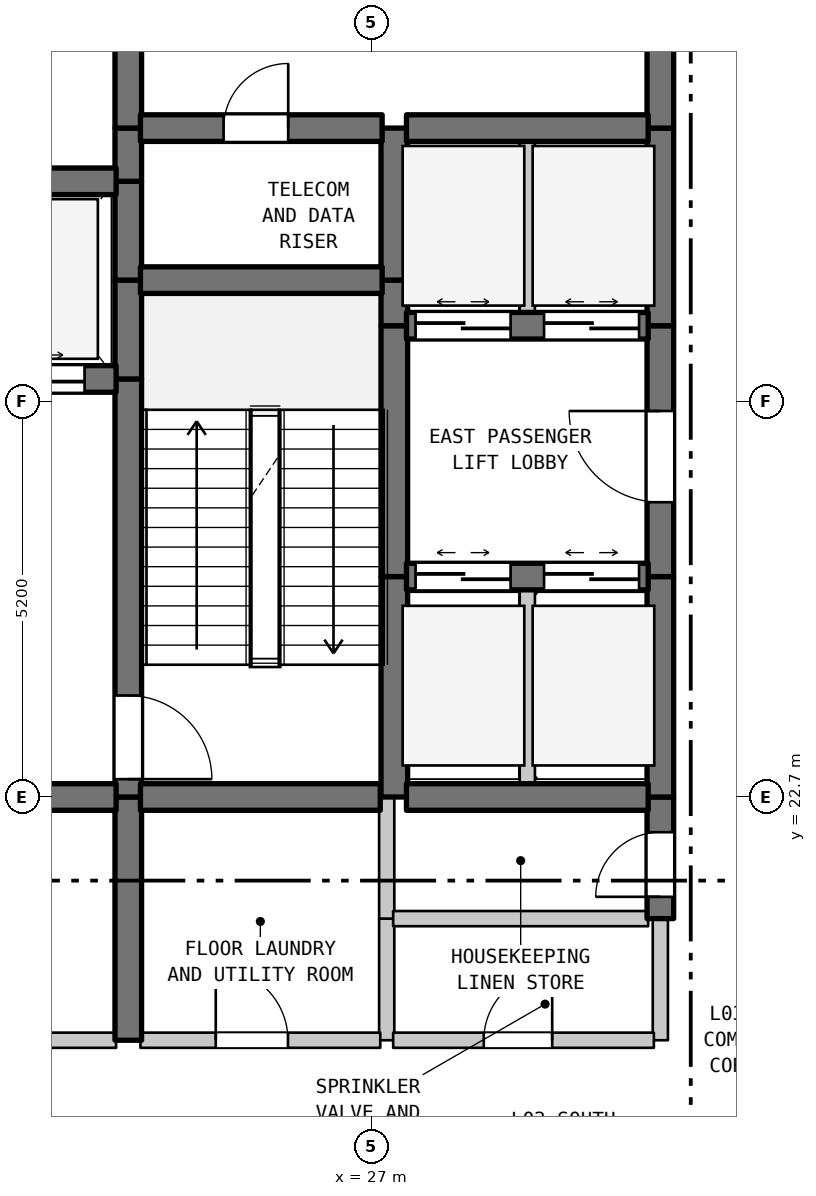
"""IFC4 building model, lengths in metres.
Left out: names, types, materials, properties, quantities, classifications, styles, units other than length and angle.
Written with IfcOpenShell. Run it as: python <this file> out.ifc"""

import sys

from ifc_helpers import new_model, si_unit, direction, frame, frame_2d, origin, place, context, subcontext, project, spatial, rectangle, extrude, element, fill, save


model = new_model("IFC4")
c1 = context("Model", 3, precision=1e-05, world=origin(), true_north=direction((0.0, 1.0)))
c2 = subcontext(c1, "Body", "Model", "MODEL_VIEW")
j1 = project(units=[si_unit("LENGTHUNIT", "METRE"), si_unit("PLANEANGLEUNIT", "RADIAN")], contexts=[c1])
p1 = place(None, origin())
s1 = spatial("IfcSite", under=j1, at=p1, CompositionType="ELEMENT")
p2 = place(p1, origin())
s2 = spatial("IfcBuilding", under=s1, at=p2, CompositionType="ELEMENT")
p3 = place(p2, frame((0.0, 0.0, 19.0)))
s3 = spatial("IfcBuildingStorey", under=s2, at=p3, CompositionType="ELEMENT", Elevation=19.0)
p4 = place(p3, frame((23.8, 19.5, 0.0), z_axis=(0.0, 0.0, 1.0), x_axis=(0.0, 1.0, 0.0)))
e1 = element("IfcWall", 1, at=p4, inside=s3, PredefinedType="SHEAR", context=c2, shape_type="SweptSolid", body=[
    extrude(rectangle(XDim=3.2, YDim=0.35, at=frame_2d((1.6, 0.0))), origin(), (0.0, 0.0, 1.0), 4.685),
])
p5 = place(p3, frame((23.8, 22.7, 0.0), z_axis=(0.0, 0.0, 1.0), x_axis=(0.0, 1.0, 0.0)))
e2 = element("IfcWall", 2, at=p5, inside=s3, PredefinedType="SHEAR", context=c2, shape_type="SweptSolid", body=[
    extrude(rectangle(XDim=5.5, YDim=0.35, at=frame_2d((2.75, 0.0))), origin(), (0.0, 0.0, 1.0), 4.685),
])
p6 = place(p5, frame((0.235, 0.0, 0.0)))
e3 = element("IfcOpeningElement", 3, at=p6, cuts=e2, PredefinedType="OPENING", context=c2, shape_type="SweptSolid", body=[
    extrude(rectangle(XDim=1.1, YDim=2.15, at=frame_2d((0.55, 1.075))), frame((0.0, 0.185, 0.0), z_axis=(0.0, -1.0, 0.0), x_axis=(1.0, 0.0, 0.0)), (0.0, 0.0, 1.0), 0.37),
])
for number, where, z_axis, x_axis in (
    (4, (23.8, 28.2, 0.0), (0.0, 0.0, 1.0), (0.0, 1.0, 0.0)),
    (5, (23.8, 29.5, 0.0), (0.0, 0.0, 1.0), (0.0, 1.0, 0.0)),
):
    element("IfcWall", number, at=place(p3, frame(where, z_axis=z_axis, x_axis=x_axis)), inside=s3, PredefinedType="SHEAR", context=c2, shape_type="SweptSolid", body=[
        extrude(rectangle(XDim=1.3, YDim=0.35, at=frame_2d((0.65, 0.0))), origin(), (0.0, 0.0, 1.0), 4.685),
    ])
p7 = place(p3, frame((23.8, 30.8, 0.0), z_axis=(0.0, 0.0, 1.0), x_axis=(0.0, 1.0, 0.0)))
e6 = element("IfcWall", 6, at=p7, inside=s3, PredefinedType="SHEAR", context=c2, shape_type="SweptSolid", body=[
    extrude(rectangle(XDim=0.7, YDim=0.35, at=frame_2d((0.35, 0.0))), origin(), (0.0, 0.0, 1.0), 4.685),
])
p8 = place(p3, frame((23.8, 31.5, 0.0), z_axis=(0.0, 0.0, 1.0), x_axis=(0.0, 1.0, 0.0)))
e7 = element("IfcWall", 7, at=p8, inside=s3, PredefinedType="SHEAR", context=c2, shape_type="SweptSolid", body=[
    extrude(rectangle(XDim=3.5, YDim=0.35, at=frame_2d((1.75, 0.0))), origin(), (0.0, 0.0, 1.0), 4.685),
])
p9 = place(p8, frame((1.127, 0.0, 0.0)))
e8 = element("IfcOpeningElement", 8, at=p9, cuts=e7, PredefinedType="OPENING", context=c2, shape_type="SweptSolid", body=[
    extrude(rectangle(XDim=1.1, YDim=2.15, at=frame_2d((0.55, 1.075))), frame((0.0, 0.185, 0.0), z_axis=(0.0, -1.0, 0.0), x_axis=(1.0, 0.0, 0.0)), (0.0, 0.0, 1.0), 0.37),
])
p10 = place(p3, frame((27.2, 19.5, 0.0), z_axis=(0.0, 0.0, 1.0), x_axis=(0.0, 1.0, 0.0)))
e9 = element("IfcWall", 9, at=p10, inside=s3, PredefinedType="STANDARD", context=c2, shape_type="SweptSolid", body=[
    extrude(rectangle(XDim=1.6, YDim=0.2, at=frame_2d((0.8, 0.0))), origin(), (0.0, 0.0, 1.0), 4.685),
])
p11 = place(p3, frame((27.2, 21.1, 0.0), z_axis=(0.0, 0.0, 1.0), x_axis=(0.0, 1.0, 0.0)))
e10 = element("IfcWall", 10, at=p11, inside=s3, PredefinedType="STANDARD", context=c2, shape_type="SweptSolid", body=[
    extrude(rectangle(XDim=1.6, YDim=0.2, at=frame_2d((0.8, 0.0))), origin(), (0.0, 0.0, 1.0), 4.685),
])
p12 = place(p3, frame((27.3, 22.7, 0.0), z_axis=(0.0, 0.0, 1.0), x_axis=(0.0, 1.0, 0.0)))
e11 = element("IfcWall", 11, at=p12, inside=s3, PredefinedType="SHEAR", context=c2, shape_type="SweptSolid", body=[
    extrude(rectangle(XDim=2.9, YDim=0.35, at=frame_2d((1.45, 0.0))), origin(), (0.0, 0.0, 1.0), 4.685),
])
p13 = place(p3, frame((27.3, 25.6, 0.0), z_axis=(0.0, 0.0, 1.0), x_axis=(0.0, 1.0, 0.0)))
e12 = element("IfcWall", 12, at=p13, inside=s3, PredefinedType="SHEAR", context=c2, shape_type="SweptSolid", body=[
    extrude(rectangle(XDim=3.3, YDim=0.35, at=frame_2d((1.65, 0.0))), origin(), (0.0, 0.0, 1.0), 4.685),
])
p14 = place(p3, frame((27.3, 28.9, 0.0), z_axis=(0.0, 0.0, 1.0), x_axis=(0.0, 1.0, 0.0)))
e13 = element("IfcWall", 13, at=p14, inside=s3, PredefinedType="SHEAR", context=c2, shape_type="SweptSolid", body=[
    extrude(rectangle(XDim=0.6, YDim=0.35, at=frame_2d((0.3, 0.0))), origin(), (0.0, 0.0, 1.0), 4.685),
])
p15 = place(p3, frame((27.3, 29.5, 0.0), z_axis=(0.0, 0.0, 1.0), x_axis=(0.0, 1.0, 0.0)))
e14 = element("IfcWall", 14, at=p15, inside=s3, PredefinedType="SHEAR", context=c2, shape_type="SweptSolid", body=[
    extrude(rectangle(XDim=2.0, YDim=0.35, at=frame_2d((1.0, 0.0))), origin(), (0.0, 0.0, 1.0), 4.685),
])
p16 = place(p3, frame((29.05, 22.7, 0.0), z_axis=(0.0, 0.0, 1.0), x_axis=(0.0, 1.0, 0.0)))
e15 = element("IfcWall", 15, at=p16, inside=s3, PredefinedType="STANDARD", context=c2, shape_type="SweptSolid", body=[
    extrude(rectangle(XDim=2.9, YDim=0.2, at=frame_2d((1.45, 0.0))), origin(), (0.0, 0.0, 1.0), 4.685),
])
p17 = place(p3, frame((29.05, 28.9, 0.0), z_axis=(0.0, 0.0, 1.0), x_axis=(0.0, 1.0, 0.0)))
e16 = element("IfcWall", 16, at=p17, inside=s3, PredefinedType="STANDARD", context=c2, shape_type="SweptSolid", body=[
    extrude(rectangle(XDim=2.6, YDim=0.2, at=frame_2d((1.3, 0.0))), origin(), (0.0, 0.0, 1.0), 4.685),
])
p18 = place(p3, frame((30.8, 19.5, 0.0), z_axis=(0.0, 0.0, 1.0), x_axis=(0.0, 1.0, 0.0)))
e17 = element("IfcWall", 17, at=p18, inside=s3, PredefinedType="STANDARD", context=c2, shape_type="SweptSolid", body=[
    extrude(rectangle(XDim=1.6, YDim=0.2, at=frame_2d((0.8, 0.0))), origin(), (0.0, 0.0, 1.0), 4.685),
])
p19 = place(p3, frame((30.8, 21.1, 0.0), z_axis=(0.0, 0.0, 1.0), x_axis=(0.0, 1.0, 0.0)))
e18 = element("IfcWall", 18, at=p19, inside=s3, PredefinedType="SHEAR", context=c2, shape_type="SweptSolid", body=[
    extrude(rectangle(XDim=1.6, YDim=0.35, at=frame_2d((0.8, 0.0))), origin(), (0.0, 0.0, 1.0), 4.685),
])
p20 = place(p19, frame((0.287, 0.0, 0.0)))
e19 = element("IfcOpeningElement", 19, at=p20, cuts=e18, PredefinedType="OPENING", context=c2, shape_type="SweptSolid", body=[
    extrude(rectangle(XDim=0.85, YDim=2.1, at=frame_2d((0.425, 1.05))), frame((0.0, 0.185, 0.0), z_axis=(0.0, -1.0, 0.0), x_axis=(1.0, 0.0, 0.0)), (0.0, 0.0, 1.0), 0.37),
])
p21 = place(p3, frame((30.8, 22.7, 0.0), z_axis=(0.0, 0.0, 1.0), x_axis=(0.0, 1.0, 0.0)))
e20 = element("IfcWall", 20, at=p21, inside=s3, PredefinedType="SHEAR", context=c2, shape_type="SweptSolid", body=[
    extrude(rectangle(XDim=2.9, YDim=0.35, at=frame_2d((1.45, 0.0))), origin(), (0.0, 0.0, 1.0), 4.685),
])
p22 = place(p3, frame((30.8, 25.6, 0.0), z_axis=(0.0, 0.0, 1.0), x_axis=(0.0, 1.0, 0.0)))
e21 = element("IfcWall", 21, at=p22, inside=s3, PredefinedType="SHEAR", context=c2, shape_type="SweptSolid", body=[
    extrude(rectangle(XDim=3.3, YDim=0.35, at=frame_2d((1.65, 0.0))), origin(), (0.0, 0.0, 1.0), 4.685),
])
p23 = place(p22, frame((0.978, 0.0, 0.0)))
e22 = element("IfcOpeningElement", 22, at=p23, cuts=e21, PredefinedType="OPENING", context=c2, shape_type="SweptSolid", body=[
    extrude(rectangle(XDim=1.2, YDim=2.2, at=frame_2d((0.6, 1.1))), frame((0.0, 0.185, 0.0), z_axis=(0.0, -1.0, 0.0), x_axis=(1.0, 0.0, 0.0)), (0.0, 0.0, 1.0), 0.37),
])
p24 = place(p3, frame((30.8, 28.9, 0.0), z_axis=(0.0, 0.0, 1.0), x_axis=(0.0, 1.0, 0.0)))
e23 = element("IfcWall", 23, at=p24, inside=s3, PredefinedType="SHEAR", context=c2, shape_type="SweptSolid", body=[
    extrude(rectangle(XDim=2.6, YDim=0.35, at=frame_2d((1.3, 0.0))), origin(), (0.0, 0.0, 1.0), 4.685),
])
p25 = place(p3, frame((30.8, 31.5, 0.0), z_axis=(0.0, 0.0, 1.0), x_axis=(0.0, 1.0, 0.0)))
e24 = element("IfcWall", 24, at=p25, inside=s3, PredefinedType="SHEAR", context=c2, shape_type="SweptSolid", body=[
    extrude(rectangle(XDim=3.5, YDim=0.35, at=frame_2d((1.75, 0.0))), origin(), (0.0, 0.0, 1.0), 4.685),
])
p26 = place(p25, frame((1.15, 0.0, 0.0)))
e25 = element("IfcOpeningElement", 25, at=p26, cuts=e24, PredefinedType="OPENING", context=c2, shape_type="SweptSolid", body=[
    extrude(rectangle(XDim=1.2, YDim=2.2, at=frame_2d((0.6, 1.1))), frame((0.0, 0.185, 0.0), z_axis=(0.0, -1.0, 0.0), x_axis=(1.0, 0.0, 0.0)), (0.0, 0.0, 1.0), 0.37),
])
p27 = place(p3, frame((19.16, 19.5, 0.0), z_axis=(0.0, 0.0, 1.0), x_axis=(1.0, 0.0, 0.0)))
e26 = element("IfcWall", 26, at=p27, inside=s3, PredefinedType="STANDARD", context=c2, shape_type="SweptSolid", body=[
    extrude(rectangle(XDim=4.48, YDim=0.2, at=frame_2d((2.24, 0.0))), origin(), (0.0, 0.0, 1.0), 4.685),
])
p28 = place(p27, frame((1.64, 0.0, 0.0)))
e27 = element("IfcOpeningElement", 27, at=p28, cuts=e26, PredefinedType="OPENING", context=c2, shape_type="SweptSolid", body=[
    extrude(rectangle(XDim=1.2, YDim=2.2, at=frame_2d((0.6, 1.1))), frame((0.0, 0.11, 0.0), z_axis=(0.0, -1.0, 0.0), x_axis=(1.0, 0.0, 0.0)), (0.0, 0.0, 1.0), 0.22),
])
p29 = place(p3, frame((23.96, 19.5, 0.0), z_axis=(0.0, 0.0, 1.0), x_axis=(1.0, 0.0, 0.0)))
e28 = element("IfcWall", 28, at=p29, inside=s3, PredefinedType="STANDARD", context=c2, shape_type="SweptSolid", body=[
    extrude(rectangle(XDim=3.155, YDim=0.2, at=frame_2d((1.578, 0.0))), origin(), (0.0, 0.0, 1.0), 4.685),
])
p30 = place(p29, frame((0.991, 0.0, 0.0)))
e29 = element("IfcOpeningElement", 29, at=p30, cuts=e28, PredefinedType="OPENING", context=c2, shape_type="SweptSolid", body=[
    extrude(rectangle(XDim=0.95, YDim=2.15, at=frame_2d((0.475, 1.075))), frame((0.0, 0.11, 0.0), z_axis=(0.0, -1.0, 0.0), x_axis=(1.0, 0.0, 0.0)), (0.0, 0.0, 1.0), 0.22),
])
p31 = place(p3, frame((27.285, 19.5, 0.0), z_axis=(0.0, 0.0, 1.0), x_axis=(1.0, 0.0, 0.0)))
e30 = element("IfcWall", 30, at=p31, inside=s3, PredefinedType="STANDARD", context=c2, shape_type="SweptSolid", body=[
    extrude(rectangle(XDim=3.43, YDim=0.2, at=frame_2d((1.715, 0.0))), origin(), (0.0, 0.0, 1.0), 4.685),
])
p32 = place(p31, frame((1.192, 0.0, 0.0)))
e31 = element("IfcOpeningElement", 31, at=p32, cuts=e30, PredefinedType="OPENING", context=c2, shape_type="SweptSolid", body=[
    extrude(rectangle(XDim=0.9, YDim=2.15, at=frame_2d((0.45, 1.075))), frame((0.0, 0.11, 0.0), z_axis=(0.0, -1.0, 0.0), x_axis=(1.0, 0.0, 0.0)), (0.0, 0.0, 1.0), 0.22),
])
p33 = place(p3, frame((27.285, 21.1, 0.0), z_axis=(0.0, 0.0, 1.0), x_axis=(1.0, 0.0, 0.0)))
e32 = element("IfcWall", 32, at=p33, inside=s3, PredefinedType="STANDARD", context=c2, shape_type="SweptSolid", body=[
    extrude(rectangle(XDim=3.355, YDim=0.2, at=frame_2d((1.677, 0.0))), origin(), (0.0, 0.0, 1.0), 4.685),
])
p34 = place(p3, frame((19.16, 22.7, 0.0), z_axis=(0.0, 0.0, 1.0), x_axis=(1.0, 0.0, 0.0)))
e33 = element("IfcWall", 33, at=p34, inside=s3, PredefinedType="SHEAR", context=c2, shape_type="SweptSolid", body=[
    extrude(rectangle(XDim=4.48, YDim=0.35, at=frame_2d((2.24, 0.0))), origin(), (0.0, 0.0, 1.0), 4.685),
])
p35 = place(p34, frame((1.64, 0.0, 0.0)))
e34 = element("IfcOpeningElement", 34, at=p35, cuts=e33, PredefinedType="OPENING", context=c2, shape_type="SweptSolid", body=[
    extrude(rectangle(XDim=1.2, YDim=2.2, at=frame_2d((0.6, 1.1))), frame((0.0, 0.185, 0.0), z_axis=(0.0, -1.0, 0.0), x_axis=(1.0, 0.0, 0.0)), (0.0, 0.0, 1.0), 0.37),
])
p36 = place(p3, frame((23.96, 22.7, 0.0), z_axis=(0.0, 0.0, 1.0), x_axis=(1.0, 0.0, 0.0)))
e35 = element("IfcWall", 35, at=p36, inside=s3, PredefinedType="SHEAR", context=c2, shape_type="SweptSolid", body=[
    extrude(rectangle(XDim=3.155, YDim=0.35, at=frame_2d((1.578, 0.0))), origin(), (0.0, 0.0, 1.0), 4.685),
])
p37 = place(p3, frame((27.46, 22.7, 0.0), z_axis=(0.0, 0.0, 1.0), x_axis=(1.0, 0.0, 0.0)))
e36 = element("IfcWall", 36, at=p37, inside=s3, PredefinedType="SHEAR", context=c2, shape_type="SweptSolid", body=[
    extrude(rectangle(XDim=3.18, YDim=0.35, at=frame_2d((1.59, 0.0))), origin(), (0.0, 0.0, 1.0), 4.685),
])
p38 = place(p3, frame((27.46, 25.6, 0.0), z_axis=(0.0, 0.0, 1.0), x_axis=(1.0, 0.0, 0.0)))
e37 = element("IfcWall", 37, at=p38, inside=s3, PredefinedType="SHEAR", context=c2, shape_type="SweptSolid", body=[
    extrude(rectangle(XDim=3.18, YDim=0.35, at=frame_2d((1.59, 0.0))), origin(), (0.0, 0.0, 1.0), 4.685),
])
p39 = place(p38, frame((0.12, 0.0, 0.0)))
e38 = element("IfcOpeningElement", 38, at=p39, cuts=e37, PredefinedType="OPENING", context=c2, shape_type="SweptSolid", body=[
    extrude(rectangle(XDim=1.25, YDim=2.2, at=frame_2d((0.625, 1.1))), frame((0.0, 0.185, 0.0), z_axis=(0.0, -1.0, 0.0), x_axis=(1.0, 0.0, 0.0)), (0.0, 0.0, 1.0), 0.37),
])
p40 = place(p38, frame((1.81, 0.0, 0.0)))
e39 = element("IfcOpeningElement", 39, at=p40, cuts=e37, PredefinedType="OPENING", context=c2, shape_type="SweptSolid", body=[
    extrude(rectangle(XDim=1.25, YDim=2.2, at=frame_2d((0.625, 1.1))), frame((0.0, 0.185, 0.0), z_axis=(0.0, -1.0, 0.0), x_axis=(1.0, 0.0, 0.0)), (0.0, 0.0, 1.0), 0.37),
])
p41 = place(p3, frame((19.16, 28.2, 0.0), z_axis=(0.0, 0.0, 1.0), x_axis=(1.0, 0.0, 0.0)))
e40 = element("IfcWall", 40, at=p41, inside=s3, PredefinedType="SHEAR", context=c2, shape_type="SweptSolid", body=[
    extrude(rectangle(XDim=4.48, YDim=0.35, at=frame_2d((2.24, 0.0))), origin(), (0.0, 0.0, 1.0), 4.685),
])
p42 = place(p41, frame((0.415, 0.0, 0.0)))
e41 = element("IfcOpeningElement", 41, at=p42, cuts=e40, PredefinedType="OPENING", context=c2, shape_type="SweptSolid", body=[
    extrude(rectangle(XDim=1.25, YDim=2.2, at=frame_2d((0.625, 1.1))), frame((0.0, 0.185, 0.0), z_axis=(0.0, -1.0, 0.0), x_axis=(1.0, 0.0, 0.0)), (0.0, 0.0, 1.0), 0.37),
])
p43 = place(p41, frame((2.815, 0.0, 0.0)))
e42 = element("IfcOpeningElement", 42, at=p43, cuts=e40, PredefinedType="OPENING", context=c2, shape_type="SweptSolid", body=[
    extrude(rectangle(XDim=1.25, YDim=2.2, at=frame_2d((0.625, 1.1))), frame((0.0, 0.185, 0.0), z_axis=(0.0, -1.0, 0.0), x_axis=(1.0, 0.0, 0.0)), (0.0, 0.0, 1.0), 0.37),
])
p44 = place(p3, frame((27.46, 28.9, 0.0), z_axis=(0.0, 0.0, 1.0), x_axis=(1.0, 0.0, 0.0)))
e43 = element("IfcWall", 43, at=p44, inside=s3, PredefinedType="SHEAR", context=c2, shape_type="SweptSolid", body=[
    extrude(rectangle(XDim=3.18, YDim=0.35, at=frame_2d((1.59, 0.0))), origin(), (0.0, 0.0, 1.0), 4.685),
])
p45 = place(p44, frame((0.12, 0.0, 0.0)))
e44 = element("IfcOpeningElement", 44, at=p45, cuts=e43, PredefinedType="OPENING", context=c2, shape_type="SweptSolid", body=[
    extrude(rectangle(XDim=1.25, YDim=2.2, at=frame_2d((0.625, 1.1))), frame((0.0, 0.185, 0.0), z_axis=(0.0, -1.0, 0.0), x_axis=(1.0, 0.0, 0.0)), (0.0, 0.0, 1.0), 0.37),
])
p46 = place(p44, frame((1.81, 0.0, 0.0)))
e45 = element("IfcOpeningElement", 45, at=p46, cuts=e43, PredefinedType="OPENING", context=c2, shape_type="SweptSolid", body=[
    extrude(rectangle(XDim=1.25, YDim=2.2, at=frame_2d((0.625, 1.1))), frame((0.0, 0.185, 0.0), z_axis=(0.0, -1.0, 0.0), x_axis=(1.0, 0.0, 0.0)), (0.0, 0.0, 1.0), 0.37),
])
p47 = place(p3, frame((23.96, 29.5, 0.0), z_axis=(0.0, 0.0, 1.0), x_axis=(1.0, 0.0, 0.0)))
e46 = element("IfcWall", 46, at=p47, inside=s3, PredefinedType="SHEAR", context=c2, shape_type="SweptSolid", body=[
    extrude(rectangle(XDim=3.18, YDim=0.35, at=frame_2d((1.59, 0.0))), origin(), (0.0, 0.0, 1.0), 4.685),
])
p48 = place(p3, frame((19.16, 30.8, 0.0), z_axis=(0.0, 0.0, 1.0), x_axis=(1.0, 0.0, 0.0)))
e47 = element("IfcWall", 47, at=p48, inside=s3, PredefinedType="SHEAR", context=c2, shape_type="SweptSolid", body=[
    extrude(rectangle(XDim=4.48, YDim=0.35, at=frame_2d((2.24, 0.0))), origin(), (0.0, 0.0, 1.0), 4.685),
])
p49 = place(p3, frame((23.96, 31.5, 0.0), z_axis=(0.0, 0.0, 1.0), x_axis=(1.0, 0.0, 0.0)))
e48 = element("IfcWall", 48, at=p49, inside=s3, PredefinedType="SHEAR", context=c2, shape_type="SweptSolid", body=[
    extrude(rectangle(XDim=3.18, YDim=0.35, at=frame_2d((1.59, 0.0))), origin(), (0.0, 0.0, 1.0), 4.685),
])
p50 = place(p49, frame((1.094, 0.0, 0.0)))
e49 = element("IfcOpeningElement", 49, at=p50, cuts=e48, PredefinedType="OPENING", context=c2, shape_type="SweptSolid", body=[
    extrude(rectangle(XDim=0.85, YDim=2.1, at=frame_2d((0.425, 1.05))), frame((0.0, 0.185, 0.0), z_axis=(0.0, -1.0, 0.0), x_axis=(1.0, 0.0, 0.0)), (0.0, 0.0, 1.0), 0.37),
])
p51 = place(p3, frame((27.46, 31.5, 0.0), z_axis=(0.0, 0.0, 1.0), x_axis=(1.0, 0.0, 0.0)))
e50 = element("IfcWall", 50, at=p51, inside=s3, PredefinedType="SHEAR", context=c2, shape_type="SweptSolid", body=[
    extrude(rectangle(XDim=3.18, YDim=0.35, at=frame_2d((1.59, 0.0))), origin(), (0.0, 0.0, 1.0), 4.685),
])
p52 = place(p6, frame((1.1, 0.0, 0.0), z_axis=(0.0, 0.0, 1.0), x_axis=(-1.0, 0.0, 0.0)))
e51 = element("IfcDoor", 51, at=p52, inside=s3, OperationType="SINGLE_SWING_LEFT", PredefinedType="DOOR", context=c2, shape_type="SweptSolid", body=[
    extrude(rectangle(XDim=1.1, YDim=2.15, at=frame_2d((0.55, 1.075))), frame((0.0, 0.025, 0.0), z_axis=(0.0, -1.0, 0.0), x_axis=(1.0, 0.0, 0.0)), (0.0, 0.0, 1.0), 0.05),
])
fill(e3, e51)
p53 = place(p20, origin())
e52 = element("IfcDoor", 52, at=p53, inside=s3, OperationType="SINGLE_SWING_LEFT", PredefinedType="DOOR", context=c2, shape_type="SweptSolid", body=[
    extrude(rectangle(XDim=0.85, YDim=2.1, at=frame_2d((0.425, 1.05))), frame((0.0, 0.025, 0.0), z_axis=(0.0, -1.0, 0.0), x_axis=(1.0, 0.0, 0.0)), (0.0, 0.0, 1.0), 0.05),
])
fill(e19, e52)
p54 = place(p23, origin())
e53 = element("IfcDoor", 53, at=p54, inside=s3, OperationType="SINGLE_SWING_RIGHT", PredefinedType="DOOR", context=c2, shape_type="SweptSolid", body=[
    extrude(rectangle(XDim=1.2, YDim=2.2, at=frame_2d((0.6, 1.1))), frame((0.0, 0.025, 0.0), z_axis=(0.0, -1.0, 0.0), x_axis=(1.0, 0.0, 0.0)), (0.0, 0.0, 1.0), 0.05),
])
fill(e22, e53)
p55 = place(p30, origin())
e54 = element("IfcDoor", 54, at=p55, inside=s3, OperationType="SINGLE_SWING_LEFT", PredefinedType="DOOR", context=c2, shape_type="SweptSolid", body=[
    extrude(rectangle(XDim=0.95, YDim=2.15, at=frame_2d((0.475, 1.075))), frame((0.0, 0.025, 0.0), z_axis=(0.0, -1.0, 0.0), x_axis=(1.0, 0.0, 0.0)), (0.0, 0.0, 1.0), 0.05),
])
fill(e29, e54)
p56 = place(p32, origin())
e55 = element("IfcDoor", 55, at=p56, inside=s3, OperationType="SINGLE_SWING_RIGHT", PredefinedType="DOOR", context=c2, shape_type="SweptSolid", body=[
    extrude(rectangle(XDim=0.9, YDim=2.15, at=frame_2d((0.45, 1.075))), frame((0.0, 0.025, 0.0), z_axis=(0.0, -1.0, 0.0), x_axis=(1.0, 0.0, 0.0)), (0.0, 0.0, 1.0), 0.05),
])
fill(e31, e55)
p57 = place(p39, origin())
e56 = element("IfcDoor", 56, at=p57, inside=s3, OperationType="DOUBLE_DOOR_SLIDING", PredefinedType="DOOR", context=c2, shape_type="SweptSolid", body=[
    extrude(rectangle(XDim=1.25, YDim=2.2, at=frame_2d((0.625, 1.1))), frame((0.0, 0.025, 0.0), z_axis=(0.0, -1.0, 0.0), x_axis=(1.0, 0.0, 0.0)), (0.0, 0.0, 1.0), 0.05),
])
fill(e38, e56)
p58 = place(p40, origin())
e57 = element("IfcDoor", 57, at=p58, inside=s3, OperationType="DOUBLE_DOOR_SLIDING", PredefinedType="DOOR", context=c2, shape_type="SweptSolid", body=[
    extrude(rectangle(XDim=1.25, YDim=2.2, at=frame_2d((0.625, 1.1))), frame((0.0, 0.025, 0.0), z_axis=(0.0, -1.0, 0.0), x_axis=(1.0, 0.0, 0.0)), (0.0, 0.0, 1.0), 0.05),
])
fill(e39, e57)
p59 = place(p43, origin())
e58 = element("IfcDoor", 58, at=p59, inside=s3, OperationType="DOUBLE_DOOR_SLIDING", PredefinedType="DOOR", context=c2, shape_type="SweptSolid", body=[
    extrude(rectangle(XDim=1.25, YDim=2.2, at=frame_2d((0.625, 1.1))), frame((0.0, 0.025, 0.0), z_axis=(0.0, -1.0, 0.0), x_axis=(1.0, 0.0, 0.0)), (0.0, 0.0, 1.0), 0.05),
])
fill(e42, e58)
p60 = place(p45, origin())
e59 = element("IfcDoor", 59, at=p60, inside=s3, OperationType="DOUBLE_DOOR_SLIDING", PredefinedType="DOOR", context=c2, shape_type="SweptSolid", body=[
    extrude(rectangle(XDim=1.25, YDim=2.2, at=frame_2d((0.625, 1.1))), frame((0.0, 0.025, 0.0), z_axis=(0.0, -1.0, 0.0), x_axis=(1.0, 0.0, 0.0)), (0.0, 0.0, 1.0), 0.05),
])
fill(e44, e59)
p61 = place(p46, origin())
e60 = element("IfcDoor", 60, at=p61, inside=s3, OperationType="DOUBLE_DOOR_SLIDING", PredefinedType="DOOR", context=c2, shape_type="SweptSolid", body=[
    extrude(rectangle(XDim=1.25, YDim=2.2, at=frame_2d((0.625, 1.1))), frame((0.0, 0.025, 0.0), z_axis=(0.0, -1.0, 0.0), x_axis=(1.0, 0.0, 0.0)), (0.0, 0.0, 1.0), 0.05),
])
fill(e45, e60)
p62 = place(p50, origin())
e61 = element("IfcDoor", 61, at=p62, inside=s3, OperationType="SINGLE_SWING_RIGHT", PredefinedType="DOOR", context=c2, shape_type="SweptSolid", body=[
    extrude(rectangle(XDim=0.85, YDim=2.1, at=frame_2d((0.425, 1.05))), frame((0.0, 0.025, 0.0), z_axis=(0.0, -1.0, 0.0), x_axis=(1.0, 0.0, 0.0)), (0.0, 0.0, 1.0), 0.05),
])
fill(e49, e61)
save(model, sys.argv[1])
